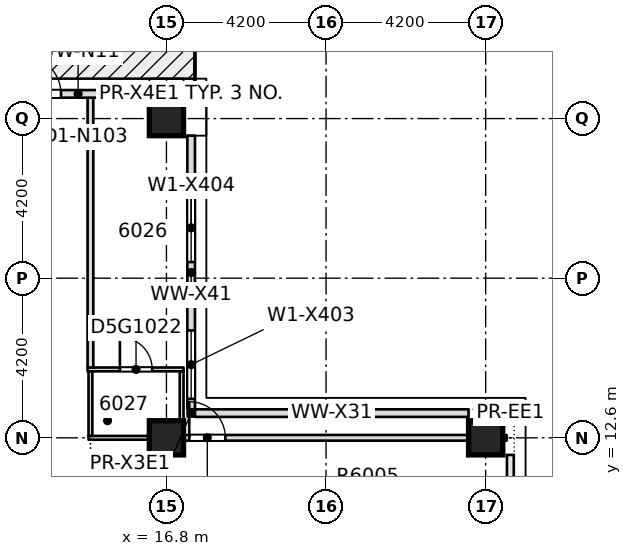
"""IFC4 building model, lengths in metres.
Left out: names, types, materials, properties, quantities, classifications, styles, units other than length and angle.
Written with IfcOpenShell. Run it as: python <this file> out.ifc"""

import sys

from ifc_helpers import new_model, si_unit, direction, frame, frame_2d, origin, origin_2d, place, context, subcontext, project, spatial, rectangle, extrude, element, fill, save


model = new_model("IFC4")
c1 = context("Model", 3, precision=1e-05, world=origin(), true_north=direction((0.0, 1.0)))
c2 = subcontext(c1, "Body", "Model", "MODEL_VIEW")
j1 = project(units=[si_unit("LENGTHUNIT", "METRE"), si_unit("PLANEANGLEUNIT", "RADIAN")], contexts=[c1])
p1 = place(None, origin())
s1 = spatial("IfcSite", under=j1, at=p1, CompositionType="ELEMENT")
p2 = place(p1, origin())
s2 = spatial("IfcBuilding", under=s1, at=p2, CompositionType="ELEMENT")
p3 = place(p2, frame((0.0, 0.0, 230.35)))
s3 = spatial("IfcBuildingStorey", under=s2, at=p3, CompositionType="ELEMENT", Elevation=230.35)
for number, where, z_axis, x_axis in (
    (1, (16.8, 12.6, -0.4), (0.0, 0.0, 1.0), (1.0, 0.0, 0.0)),
    (2, (25.2, 12.6, -0.4), (0.0, 0.0, 1.0), (1.0, 0.0, 0.0)),
    (3, (16.8, 21.0, -0.4), (0.0, 0.0, 1.0), (1.0, 0.0, 0.0)),
):
    element("IfcColumn", number, at=place(p3, frame(where, z_axis=z_axis, x_axis=x_axis)), inside=s3, PredefinedType="COLUMN", context=c2, shape_type="SweptSolid", body=[
        extrude(rectangle(XDim=0.9, YDim=0.9, at=origin_2d()), origin(), (0.0, 0.0, 1.0), 3.45),
    ])
p4 = place(p3, frame((14.75, 12.6, 0.0), z_axis=(0.0, 0.0, 1.0), x_axis=(1.0, 0.0, 0.0)))
e4 = element("IfcWall", 4, at=p4, inside=s3, PredefinedType="PARTITIONING", context=c2, shape_type="SweptSolid", body=[
    extrude(rectangle(XDim=2.5, YDim=0.1, at=frame_2d((1.25, 0.0))), origin(), (0.0, 0.0, 1.0), 3.05),
])
p5 = place(p3, frame((17.15, 12.6, 0.0), z_axis=(0.0, 0.0, 1.0), x_axis=(1.0, 0.0, 0.0)))
e5 = element("IfcWall", 5, at=p5, inside=s3, PredefinedType="PARTITIONING", context=c2, shape_type="SweptSolid", body=[
    extrude(rectangle(XDim=0.1, YDim=0.15, at=frame_2d((0.05, 0.0))), origin(), (0.0, 0.0, 1.0), 3.05),
])
p6 = place(p3, frame((14.725, 14.4, 0.0), z_axis=(0.0, 0.0, 1.0), x_axis=(1.0, 0.0, 0.0)))
e6 = element("IfcWall", 6, at=p6, inside=s3, PredefinedType="PARTITIONING", context=c2, shape_type="SweptSolid", body=[
    extrude(rectangle(XDim=2.525, YDim=0.1, at=frame_2d((1.262, 0.0))), origin(), (0.0, 0.0, 1.0), 3.05),
])
p7 = place(p6, frame((0.85, 0.0, 0.0)))
e7 = element("IfcOpeningElement", 7, at=p7, cuts=e6, PredefinedType="OPENING", context=c2, shape_type="SweptSolid", body=[
    extrude(rectangle(XDim=0.85, YDim=2.1, at=frame_2d((0.425, 1.05))), frame((0.0, 0.06, 0.0), z_axis=(0.0, -1.0, 0.0), x_axis=(1.0, 0.0, 0.0)), (0.0, 0.0, 1.0), 0.12),
])
p8 = place(p3, frame((14.8, 12.65, 0.0), z_axis=(0.0, 0.0, 1.0), x_axis=(0.0, 1.0, 0.0)))
e8 = element("IfcWall", 8, at=p8, inside=s3, PredefinedType="PARTITIONING", context=c2, shape_type="SweptSolid", body=[
    extrude(rectangle(XDim=1.7, YDim=0.1, at=frame_2d((0.85, 0.0))), origin(), (0.0, 0.0, 1.0), 3.05),
])
p9 = place(p3, frame((14.8, 14.45, 0.0), z_axis=(0.0, 0.0, 1.0), x_axis=(0.0, 1.0, 0.0)))
e9 = element("IfcWall", 9, at=p9, inside=s3, PredefinedType="PARTITIONING", context=c2, shape_type="SweptSolid", body=[
    extrude(rectangle(XDim=7.1, YDim=0.15, at=frame_2d((3.55, 0.0))), origin(), (0.0, 0.0, 1.0), 3.05),
])
p10 = place(p3, frame((17.2, 12.675, 0.0), z_axis=(0.0, 0.0, 1.0), x_axis=(0.0, 1.0, 0.0)))
e10 = element("IfcWall", 10, at=p10, inside=s3, PredefinedType="PARTITIONING", context=c2, shape_type="SweptSolid", body=[
    extrude(rectangle(XDim=1.675, YDim=0.1, at=frame_2d((0.837, 0.0))), origin(), (0.0, 0.0, 1.0), 3.05),
])
p11 = place(p3, frame((24.75, 13.25, 0.0), z_axis=(0.0, 0.0, 1.0), x_axis=(-1.0, 0.0, 0.0)))
e11 = element("IfcWall", 11, at=p11, inside=s3, PredefinedType="STANDARD", context=c2, shape_type="SweptSolid", body=[
    extrude(rectangle(XDim=7.2, YDim=0.2, at=frame_2d((3.6, 0.0))), origin(), (0.0, 0.0, 1.0), 3.05),
])
p12 = place(p3, frame((17.45, 13.35, 0.0), z_axis=(0.0, 0.0, 1.0), x_axis=(0.0, 1.0, 0.0)))
e12 = element("IfcWall", 12, at=p12, inside=s3, PredefinedType="STANDARD", context=c2, shape_type="SweptSolid", body=[
    extrude(rectangle(XDim=7.2, YDim=0.2, at=frame_2d((3.6, 0.0))), origin(), (0.0, 0.0, 1.0), 3.05),
])
p13 = place(p12, frame((0.275, 0.0, 0.2)))
e13 = element("IfcOpeningElement", 13, at=p13, cuts=e12, PredefinedType="OPENING", context=c2, shape_type="SweptSolid", body=[
    extrude(rectangle(XDim=1.8, YDim=2.65, at=frame_2d((0.9, 1.325))), frame((0.0, 0.11, 0.0), z_axis=(0.0, -1.0, 0.0), x_axis=(1.0, 0.0, 0.0)), (0.0, 0.0, 1.0), 0.22),
])
p14 = place(p12, frame((3.875, 0.0, 0.2)))
e14 = element("IfcOpeningElement", 14, at=p14, cuts=e12, PredefinedType="OPENING", context=c2, shape_type="SweptSolid", body=[
    extrude(rectangle(XDim=1.8, YDim=2.65, at=frame_2d((0.9, 1.325))), frame((0.0, 0.11, 0.0), z_axis=(0.0, -1.0, 0.0), x_axis=(1.0, 0.0, 0.0)), (0.0, 0.0, 1.0), 0.22),
])
p15 = place(p3, frame((16.35, 21.65, 0.0), z_axis=(0.0, 0.0, 1.0), x_axis=(-1.0, 0.0, 0.0)))
e15 = element("IfcWall", 15, at=p15, inside=s3, PredefinedType="STANDARD", context=c2, shape_type="SweptSolid", body=[
    extrude(rectangle(XDim=3.75, YDim=0.2, at=frame_2d((1.875, 0.0))), origin(), (0.0, 0.0, 1.0), 3.05),
])
p16 = place(p15, frame((2.325, 0.0, 0.0)))
e16 = element("IfcOpeningElement", 16, at=p16, cuts=e15, PredefinedType="OPENING", context=c2, shape_type="SweptSolid", body=[
    extrude(rectangle(XDim=1.0, YDim=2.4, at=frame_2d((0.5, 1.2))), frame((0.0, 0.11, 0.0), z_axis=(0.0, -1.0, 0.0), x_axis=(1.0, 0.0, 0.0)), (0.0, 0.0, 1.0), 0.22),
])
p17 = place(p3, frame((17.25, 12.6, 0.0), z_axis=(0.0, 0.0, 1.0), x_axis=(1.0, 0.0, 0.0)))
e17 = element("IfcWall", 17, at=p17, inside=s3, PredefinedType="PARTITIONING", context=c2, shape_type="SweptSolid", body=[
    extrude(rectangle(XDim=7.5, YDim=0.15, at=frame_2d((3.75, 0.0))), origin(), (0.0, 0.0, 1.0), 2.5),
])
p18 = place(p17, frame((0.15, 0.0, 0.0)))
e18 = element("IfcOpeningElement", 18, at=p18, cuts=e17, PredefinedType="OPENING", context=c2, shape_type="SweptSolid", body=[
    extrude(rectangle(XDim=0.95, YDim=2.1, at=frame_2d((0.475, 1.05))), frame((0.0, 0.085, 0.0), z_axis=(0.0, -1.0, 0.0), x_axis=(1.0, 0.0, 0.0)), (0.0, 0.0, 1.0), 0.17),
])
p19 = place(p3, frame((24.75, 12.6, 0.0), z_axis=(0.0, 0.0, 1.0), x_axis=(1.0, 0.0, 0.0)))
e19 = element("IfcWall", 19, at=p19, inside=s3, PredefinedType="PARTITIONING", context=c2, shape_type="SweptSolid", body=[
    extrude(rectangle(XDim=1.0, YDim=0.15, at=frame_2d((0.5, 0.0))), origin(), (0.0, 0.0, 1.0), 3.05),
])
p20 = place(p18, origin())
e20 = element("IfcDoor", 20, at=p20, inside=s3, OperationType="SINGLE_SWING_LEFT", PredefinedType="DOOR", context=c2, shape_type="SweptSolid", body=[
    extrude(rectangle(XDim=0.95, YDim=2.1, at=frame_2d((0.475, 1.05))), frame((0.0, 0.025, 0.0), z_axis=(0.0, -1.0, 0.0), x_axis=(1.0, 0.0, 0.0)), (0.0, 0.0, 1.0), 0.05),
])
fill(e18, e20)
p21 = place(p7, origin())
e21 = element("IfcDoor", 21, at=p21, inside=s3, OperationType="SINGLE_SWING_RIGHT", PredefinedType="DOOR", context=c2, shape_type="SweptSolid", body=[
    extrude(rectangle(XDim=0.85, YDim=2.1, at=frame_2d((0.425, 1.05))), frame((0.0, 0.025, 0.0), z_axis=(0.0, -1.0, 0.0), x_axis=(1.0, 0.0, 0.0)), (0.0, 0.0, 1.0), 0.05),
])
fill(e7, e21)
p22 = place(p13, origin())
e22 = element("IfcWindow", 22, at=p22, inside=s3, PartitioningType="SINGLE_PANEL", PredefinedType="WINDOW", context=c2, shape_type="SweptSolid", body=[
    extrude(rectangle(XDim=1.8, YDim=2.65, at=frame_2d((0.9, 1.325))), frame((0.0, 0.03, 0.0), z_axis=(0.0, -1.0, 0.0), x_axis=(1.0, 0.0, 0.0)), (0.0, 0.0, 1.0), 0.06),
])
fill(e13, e22)
p23 = place(p14, origin())
e23 = element("IfcWindow", 23, at=p23, inside=s3, PartitioningType="SINGLE_PANEL", PredefinedType="WINDOW", context=c2, shape_type="SweptSolid", body=[
    extrude(rectangle(XDim=1.8, YDim=2.65, at=frame_2d((0.9, 1.325))), frame((0.0, 0.03, 0.0), z_axis=(0.0, -1.0, 0.0), x_axis=(1.0, 0.0, 0.0)), (0.0, 0.0, 1.0), 0.06),
])
fill(e14, e23)
p24 = place(p16, origin())
e24 = element("IfcDoor", 24, at=p24, inside=s3, OperationType="SINGLE_SWING_LEFT", PredefinedType="DOOR", context=c2, shape_type="SweptSolid", body=[
    extrude(rectangle(XDim=1.0, YDim=2.4, at=frame_2d((0.5, 1.2))), frame((0.0, 0.025, 0.0), z_axis=(0.0, -1.0, 0.0), x_axis=(1.0, 0.0, 0.0)), (0.0, 0.0, 1.0), 0.05),
])
fill(e16, e24)
save(model, sys.argv[1])
